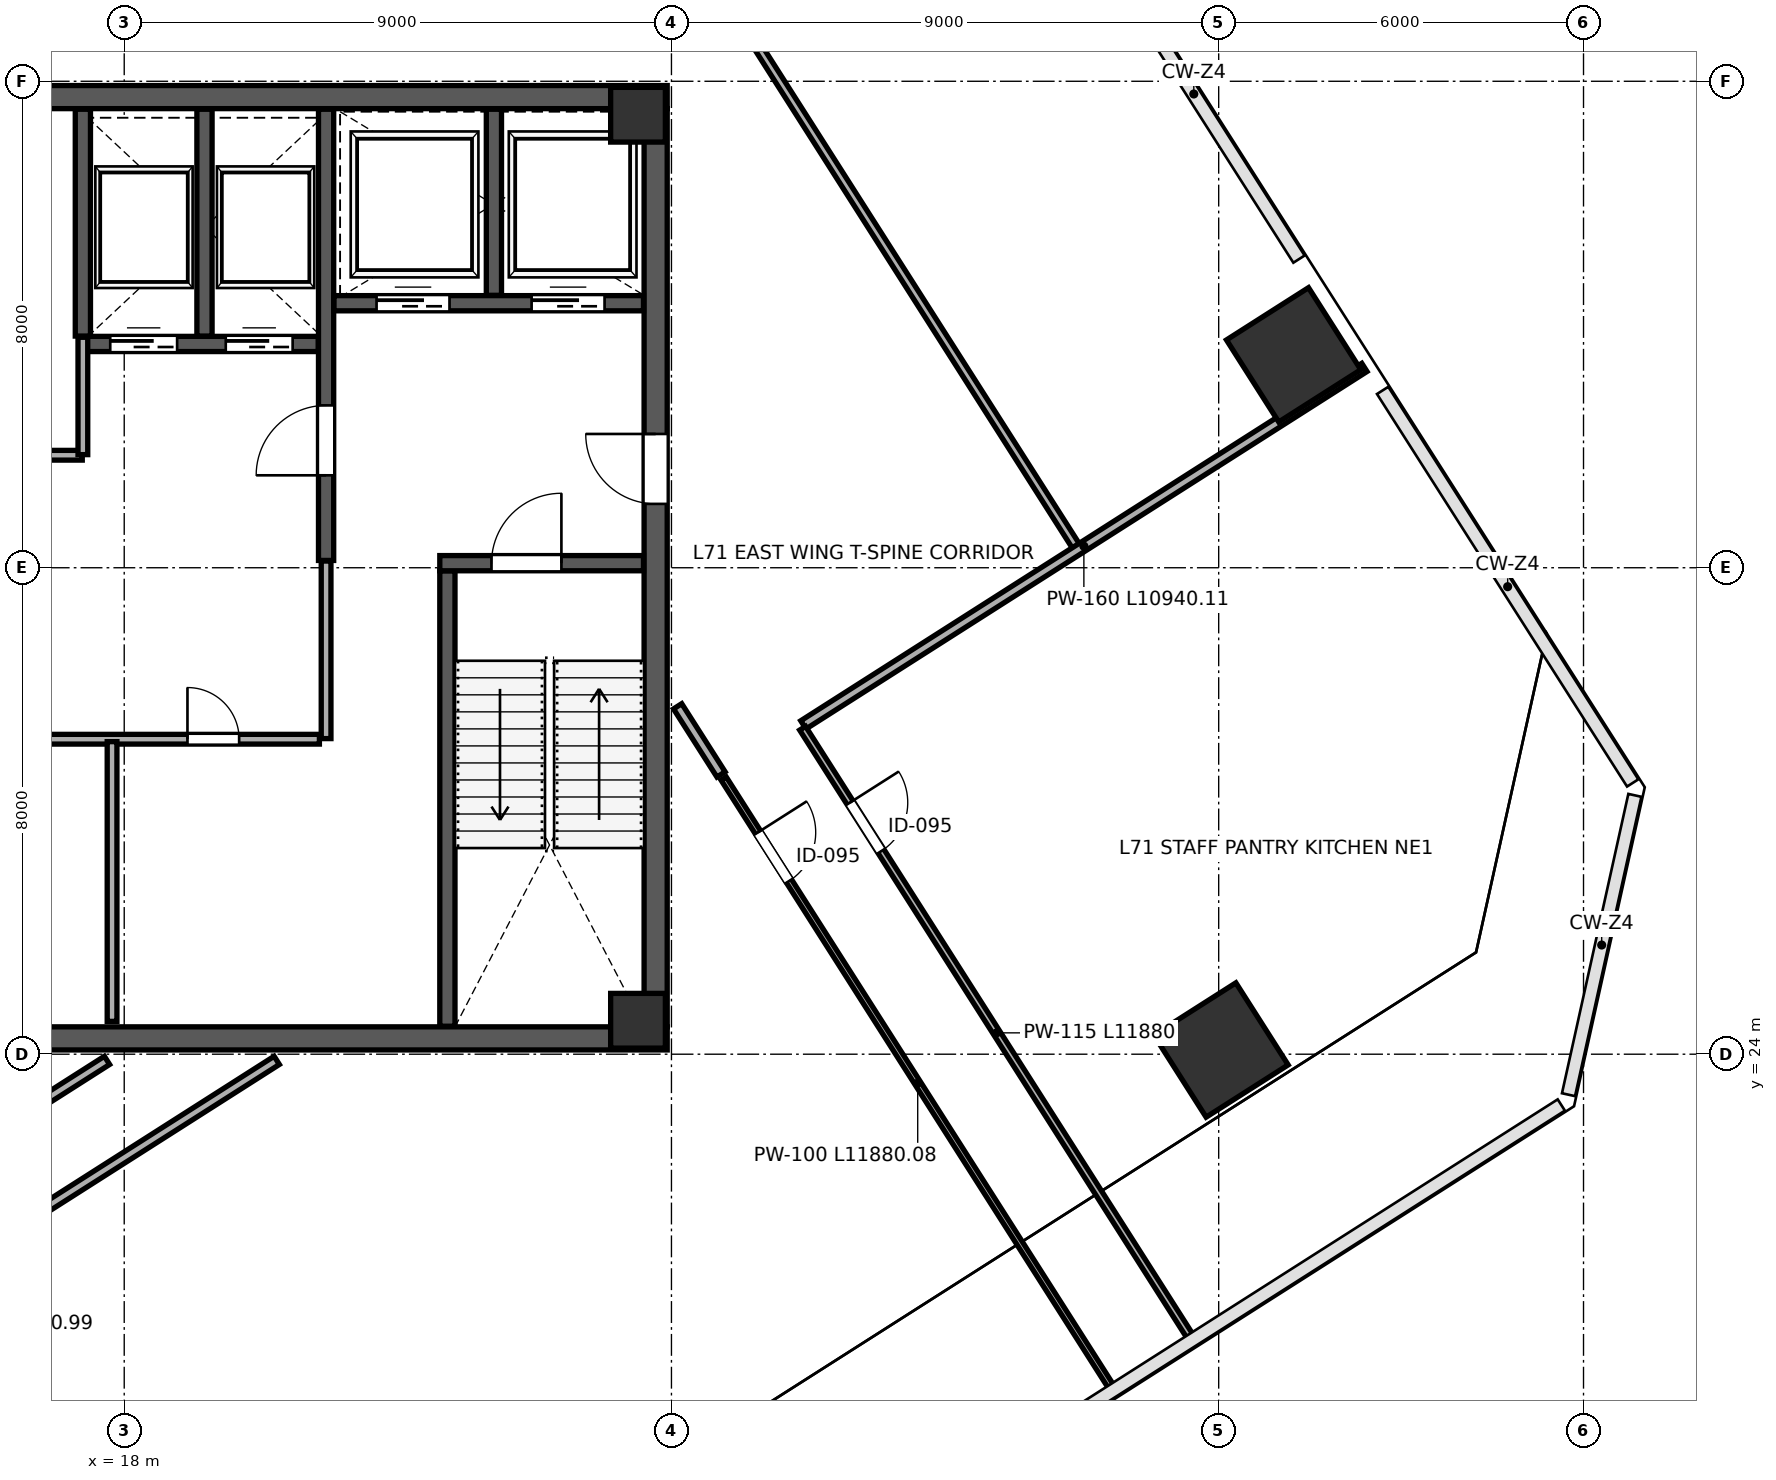
"""IFC4 building model, lengths in metres.
Left out: names, types, materials, properties, quantities, classifications, styles, units other than length and angle.
Written with IfcOpenShell. Run it as: python <this file> out.ifc"""

import sys

from ifc_helpers import new_model, si_unit, direction, frame, frame_2d, origin, origin_2d, place, context, subcontext, project, spatial, rectangle, extrude, source, transform, mapped, element, fill, save


model = new_model("IFC4")
c1 = context("Model", 3, precision=1e-05, world=origin(), true_north=direction((0.0, 1.0)))
c2 = subcontext(c1, "Body", "Model", "MODEL_VIEW")
j1 = project(units=[si_unit("LENGTHUNIT", "METRE"), si_unit("PLANEANGLEUNIT", "RADIAN")], contexts=[c1])
p1 = place(None, origin())
s1 = spatial("IfcSite", under=j1, at=p1, CompositionType="ELEMENT")
p2 = place(p1, origin())
s2 = spatial("IfcBuilding", under=s1, at=p2, CompositionType="ELEMENT")
p3 = place(p2, frame((0.0, 0.0, 315.6)))
s3 = spatial("IfcBuildingStorey", under=s2, at=p3, CompositionType="ELEMENT", Elevation=315.6)
m1 = source(origin(), c2, "Body", "SweptSolid", [
    extrude(rectangle(XDim=0.9, YDim=0.9, at=origin_2d()), origin(), (0.0, 0.0, 1.0), 4.198),
])
for number, where, z_axis, x_axis in (
    (1, (26.45, 24.55, 0.001), (0.0, 0.0, 1.0), (1.0, 0.0, 0.0)),
    (2, (26.45, 39.45, 0.001), (0.0, 0.0, 1.0), (1.0, 0.0, 0.0)),
):
    element("IfcColumn", number, at=place(p3, frame(where, z_axis=z_axis, x_axis=x_axis)), inside=s3, PredefinedType="COLUMN", context=c2, shape_type="MappedRepresentation", body=[
        mapped(m1, transform((0.0, 0.0, 0.0), scale=1.0)),
    ])
m2 = source(origin(), c2, "Body", "SweptSolid", [
    extrude(rectangle(XDim=1.6, YDim=1.6, at=origin_2d()), origin(), (0.0, 0.0, 1.0), 4.198),
])
for number, where, z_axis, x_axis in (
    (3, (37.232, 35.501, 0.001), (0.0, 0.0, 1.0), (-0.537, 0.843, 0.0)),
    (4, (36.038, 24.069, 0.001), (0.0, 0.0, 1.0), (-0.537, 0.843, 0.0)),
):
    element("IfcColumn", number, at=place(p3, frame(where, z_axis=z_axis, x_axis=x_axis)), inside=s3, PredefinedType="COLUMN", context=c2, shape_type="MappedRepresentation", body=[
        mapped(m2, transform((0.0, 0.0, 0.0), scale=1.0)),
    ])
p4 = place(p3, frame((26.74, 24.45, 0.0), z_axis=(0.0, 0.0, 1.0), x_axis=(0.0, 1.0, 0.0)))
e5 = element("IfcWall", 5, at=p4, inside=s3, PredefinedType="SHEAR", context=c2, shape_type="SweptSolid", body=[
    extrude(rectangle(XDim=15.1, YDim=0.38, at=frame_2d((7.55, 0.0))), origin(), (0.0, 0.0, 1.0), 3.96),
])
p5 = place(p4, frame((8.6, 0.0, 0.0)))
e6 = element("IfcOpeningElement", 6, at=p5, cuts=e5, PredefinedType="OPENING", context=c2, shape_type="SweptSolid", body=[
    extrude(rectangle(XDim=1.15, YDim=2.2, at=frame_2d((0.575, 1.1))), frame((0.0, 0.2, 0.0), z_axis=(0.0, -1.0, 0.0), x_axis=(1.0, 0.0, 0.0)), (0.0, 0.0, 1.0), 0.4),
])
for number, where, z_axis, x_axis in (
    (7, (9.07, 24.26, 0.0), (0.0, 0.0, 1.0), (1.0, 0.0, 0.0)),
    (8, (9.07, 39.74, 0.0), (0.0, 0.0, 1.0), (1.0, 0.0, 0.0)),
):
    element("IfcWall", number, at=place(p3, frame(where, z_axis=z_axis, x_axis=x_axis)), inside=s3, PredefinedType="SHEAR", context=c2, shape_type="SweptSolid", body=[
        extrude(rectangle(XDim=17.86, YDim=0.38, at=frame_2d((8.93, 0.0))), origin(), (0.0, 0.0, 1.0), 3.96),
    ])
p6 = place(p3, frame((23.315, 24.46, 0.0), z_axis=(0.0, 0.0, 1.0), x_axis=(0.0, 1.0, 0.0)))
e9 = element("IfcWall", 9, at=p6, inside=s3, PredefinedType="SHEAR", context=c2, shape_type="SweptSolid", body=[
    extrude(rectangle(XDim=7.49, YDim=0.25, at=frame_2d((3.745, 0.0))), origin(), (0.0, 0.0, 1.0), 3.96),
])
p7 = place(p3, frame((23.19, 32.075, 0.0), z_axis=(0.0, 0.0, 1.0), x_axis=(1.0, 0.0, 0.0)))
e10 = element("IfcWall", 10, at=p7, inside=s3, PredefinedType="SHEAR", context=c2, shape_type="SweptSolid", body=[
    extrude(rectangle(XDim=3.35, YDim=0.25, at=frame_2d((1.675, 0.0))), origin(), (0.0, 0.0, 1.0), 3.96),
])
p8 = place(p7, frame((0.85, 0.0, 0.0)))
e11 = element("IfcOpeningElement", 11, at=p8, cuts=e10, PredefinedType="OPENING", context=c2, shape_type="SweptSolid", body=[
    extrude(rectangle(XDim=1.15, YDim=2.2, at=frame_2d((0.575, 1.1))), frame((0.0, 0.135, 0.0), z_axis=(0.0, -1.0, 0.0), x_axis=(1.0, 0.0, 0.0)), (0.0, 0.0, 1.0), 0.27),
])
p9 = place(p3, frame((21.32, 32.12, 0.0), z_axis=(0.0, 0.0, 1.0), x_axis=(0.0, 1.0, 0.0)))
e12 = element("IfcWall", 12, at=p9, inside=s3, PredefinedType="SHEAR", context=c2, shape_type="SweptSolid", body=[
    extrude(rectangle(XDim=7.42, YDim=0.25, at=frame_2d((3.71, 0.0))), origin(), (0.0, 0.0, 1.0), 3.96),
])
p10 = place(p9, frame((1.4, 0.0, 0.0)))
e13 = element("IfcOpeningElement", 13, at=p10, cuts=e12, PredefinedType="OPENING", context=c2, shape_type="SweptSolid", body=[
    extrude(rectangle(XDim=1.15, YDim=2.2, at=frame_2d((0.575, 1.1))), frame((0.0, 0.135, 0.0), z_axis=(0.0, -1.0, 0.0), x_axis=(1.0, 0.0, 0.0)), (0.0, 0.0, 1.0), 0.27),
])
p11 = place(p3, frame((21.45, 36.35, 0.0), z_axis=(0.0, 0.0, 1.0), x_axis=(1.0, 0.0, 0.0)))
e14 = element("IfcWall", 14, at=p11, inside=s3, PredefinedType="SHEAR", context=c2, shape_type="SweptSolid", body=[
    extrude(rectangle(XDim=5.09, YDim=0.25, at=frame_2d((2.545, 0.0))), origin(), (0.0, 0.0, 1.0), 3.96),
])
p12 = place(p11, frame((0.7, 0.0, 0.0)))
e15 = element("IfcOpeningElement", 15, at=p12, cuts=e14, PredefinedType="OPENING", context=c2, shape_type="SweptSolid", body=[
    extrude(rectangle(XDim=1.2, YDim=2.2, at=frame_2d((0.6, 1.1))), frame((0.0, 0.135, 0.0), z_axis=(0.0, -1.0, 0.0), x_axis=(1.0, 0.0, 0.0)), (0.0, 0.0, 1.0), 0.27),
])
p13 = place(p11, frame((3.25, 0.0, 0.0)))
e16 = element("IfcOpeningElement", 16, at=p13, cuts=e14, PredefinedType="OPENING", context=c2, shape_type="SweptSolid", body=[
    extrude(rectangle(XDim=1.2, YDim=2.2, at=frame_2d((0.6, 1.1))), frame((0.0, 0.135, 0.0), z_axis=(0.0, -1.0, 0.0), x_axis=(1.0, 0.0, 0.0)), (0.0, 0.0, 1.0), 0.27),
])
p14 = place(p3, frame((24.08, 36.48, 0.0), z_axis=(0.0, 0.0, 1.0), x_axis=(0.0, 1.0, 0.0)))
e17 = element("IfcWall", 17, at=p14, inside=s3, PredefinedType="SHEAR", context=c2, shape_type="SweptSolid", body=[
    extrude(rectangle(XDim=3.06, YDim=0.25, at=frame_2d((1.53, 0.0))), origin(), (0.0, 0.0, 1.0), 3.96),
])
p15 = place(p3, frame((17.32, 35.68, 0.0), z_axis=(0.0, 0.0, 1.0), x_axis=(1.0, 0.0, 0.0)))
e18 = element("IfcWall", 18, at=p15, inside=s3, PredefinedType="SHEAR", context=c2, shape_type="SweptSolid", body=[
    extrude(rectangle(XDim=3.87, YDim=0.25, at=frame_2d((1.935, 0.0))), origin(), (0.0, 0.0, 1.0), 3.96),
])
p16 = place(p15, frame((0.45, 0.0, 0.0)))
e19 = element("IfcOpeningElement", 19, at=p16, cuts=e18, PredefinedType="OPENING", context=c2, shape_type="SweptSolid", body=[
    extrude(rectangle(XDim=1.1, YDim=2.2, at=frame_2d((0.55, 1.1))), frame((0.0, 0.135, 0.0), z_axis=(0.0, -1.0, 0.0), x_axis=(1.0, 0.0, 0.0)), (0.0, 0.0, 1.0), 0.27),
])
p17 = place(p15, frame((2.35, 0.0, 0.0)))
e20 = element("IfcOpeningElement", 20, at=p17, cuts=e18, PredefinedType="OPENING", context=c2, shape_type="SweptSolid", body=[
    extrude(rectangle(XDim=1.1, YDim=2.2, at=frame_2d((0.55, 1.1))), frame((0.0, 0.135, 0.0), z_axis=(0.0, -1.0, 0.0), x_axis=(1.0, 0.0, 0.0)), (0.0, 0.0, 1.0), 0.27),
])
for number, where, z_axis, x_axis in (
    (21, (17.32, 35.81, 0.0), (0.0, 0.0, 1.0), (0.0, 1.0, 0.0)),
    (22, (19.32, 35.81, 0.0), (0.0, 0.0, 1.0), (0.0, 1.0, 0.0)),
):
    element("IfcWall", number, at=place(p3, frame(where, z_axis=z_axis, x_axis=x_axis)), inside=s3, PredefinedType="SHEAR", context=c2, shape_type="SweptSolid", body=[
        extrude(rectangle(XDim=3.73, YDim=0.25, at=frame_2d((1.865, 0.0))), origin(), (0.0, 0.0, 1.0), 3.96),
    ])
p18 = place(p3, frame((13.21, 33.85, 0.0), z_axis=(0.0, 0.0, 1.0), x_axis=(1.0, 0.0, 0.0)))
e23 = element("IfcWall", 23, at=p18, inside=s3, PredefinedType="PARTITIONING", context=c2, shape_type="SweptSolid", body=[
    extrude(rectangle(XDim=4.1, YDim=0.16, at=frame_2d((2.05, 0.0))), origin(), (0.0, 0.0, 1.0), 3.96),
])
p19 = place(p18, frame((1.35, 0.0, 0.0)))
e24 = element("IfcOpeningElement", 24, at=p19, cuts=e23, PredefinedType="OPENING", context=c2, shape_type="SweptSolid", body=[
    extrude(rectangle(XDim=0.9, YDim=2.15, at=frame_2d((0.45, 1.075))), frame((0.0, 0.09, 0.0), z_axis=(0.0, -1.0, 0.0), x_axis=(1.0, 0.0, 0.0)), (0.0, 0.0, 1.0), 0.18),
])
p20 = place(p3, frame((17.32, 33.86, 0.0), z_axis=(0.0, 0.0, 1.0), x_axis=(0.0, 1.0, 0.0)))
e25 = element("IfcWall", 25, at=p20, inside=s3, PredefinedType="PARTITIONING", context=c2, shape_type="SweptSolid", body=[
    extrude(rectangle(XDim=1.93, YDim=0.16, at=frame_2d((0.965, 0.0))), origin(), (0.0, 0.0, 1.0), 3.96),
])
p21 = place(p3, frame((12.84, 29.18, 0.0), z_axis=(0.0, 0.0, 1.0), x_axis=(1.0, 0.0, 0.0)))
e26 = element("IfcWall", 26, at=p21, inside=s3, PredefinedType="PARTITIONING", context=c2, shape_type="SweptSolid", body=[
    extrude(rectangle(XDim=8.37, YDim=0.16, at=frame_2d((4.185, 0.0))), origin(), (0.0, 0.0, 1.0), 3.96),
])
p22 = place(p21, frame((2.1, 0.0, 0.0)))
e27 = element("IfcOpeningElement", 27, at=p22, cuts=e26, PredefinedType="OPENING", context=c2, shape_type="SweptSolid", body=[
    extrude(rectangle(XDim=0.9, YDim=2.15, at=frame_2d((0.45, 1.075))), frame((0.0, 0.09, 0.0), z_axis=(0.0, -1.0, 0.0), x_axis=(1.0, 0.0, 0.0)), (0.0, 0.0, 1.0), 0.18),
])
p23 = place(p21, frame((6.2, 0.0, 0.0)))
e28 = element("IfcOpeningElement", 28, at=p23, cuts=e26, PredefinedType="OPENING", context=c2, shape_type="SweptSolid", body=[
    extrude(rectangle(XDim=0.85, YDim=2.1, at=frame_2d((0.425, 1.05))), frame((0.0, 0.09, 0.0), z_axis=(0.0, -1.0, 0.0), x_axis=(1.0, 0.0, 0.0)), (0.0, 0.0, 1.0), 0.18),
])
p24 = place(p3, frame((17.8, 24.54, 0.0), z_axis=(0.0, 0.0, 1.0), x_axis=(0.0, 1.0, 0.0)))
e29 = element("IfcWall", 29, at=p24, inside=s3, PredefinedType="PARTITIONING", context=c2, shape_type="SweptSolid", body=[
    extrude(rectangle(XDim=4.6, YDim=0.16, at=frame_2d((2.3, 0.0))), origin(), (0.0, 0.0, 1.0), 3.96),
])
p25 = place(p3, frame((21.32, 29.19, 0.0), z_axis=(0.0, 0.0, 1.0), x_axis=(0.0, 1.0, 0.0)))
e30 = element("IfcWall", 30, at=p25, inside=s3, PredefinedType="PARTITIONING", context=c2, shape_type="SweptSolid", body=[
    extrude(rectangle(XDim=2.92, YDim=0.16, at=frame_2d((1.46, 0.0))), origin(), (0.0, 0.0, 1.0), 3.96),
])
p26 = place(p3, frame((10.661, 19.403, 0.0), z_axis=(0.0, 0.0, 1.0), x_axis=(0.843399441764, 0.537287057012, 0.0)))
e31 = element("IfcWall", 31, at=p26, inside=s3, PredefinedType="PARTITIONING", context=c2, shape_type="SweptSolid", body=[
    extrude(rectangle(XDim=8.366, YDim=0.16, at=frame_2d((4.183, 0.0))), origin(), (0.0, 0.0, 1.0), 3.96),
])
p27 = place(p3, frame((27.102, 29.721, 0.0), z_axis=(0.0, 0.0, 1.0), x_axis=(0.537279676557, -0.843404143432, 0.0)))
e32 = element("IfcWall", 32, at=p27, inside=s3, PredefinedType="PARTITIONING", context=c2, shape_type="SweptSolid", body=[
    extrude(rectangle(XDim=1.329, YDim=0.16, at=frame_2d((0.664, 0.0))), origin(), (0.0, 0.0, 1.0), 3.96),
])
p28 = place(p3, frame((22.509, 49.847, 0.0), z_axis=(0.0, 0.0, 1.0), x_axis=(0.537290700932, -0.843397120396, 0.0)))
e33 = element("IfcWall", 33, at=p28, inside=s3, PredefinedType="PARTITIONING", context=c2, shape_type="SweptSolid", body=[
    extrude(rectangle(XDim=20.77, YDim=0.135, at=frame_2d((10.385, 0.0))), origin(), (0.0, 0.0, 1.0), 3.96),
])
p29 = place(p28, frame((4.3, 0.0, 0.0)))
e34 = element("IfcOpeningElement", 34, at=p29, cuts=e33, PredefinedType="OPENING", context=c2, shape_type="SweptSolid", body=[
    extrude(rectangle(XDim=0.95, YDim=2.15, at=frame_2d((0.475, 1.075))), frame((0.0, 0.078, 0.0), z_axis=(0.0, -1.0, 0.0), x_axis=(1.0, 0.0, 0.0)), (0.0, 0.0, 1.0), 0.155),
])
p30 = place(p3, frame((29.169, 29.416, 0.0), z_axis=(0.0, 0.0, 1.0), x_axis=(0.843389386546, 0.537302840734, 0.0)))
e35 = element("IfcWall", 35, at=p30, inside=s3, PredefinedType="PARTITIONING", context=c2, shape_type="SweptSolid", body=[
    extrude(rectangle(XDim=10.94, YDim=0.16, at=frame_2d((5.47, 0.0))), origin(), (0.0, 0.0, 1.0), 3.96),
])
p31 = place(p3, frame((9.687, 17.004, 0.0), z_axis=(0.0, 0.0, 1.0), x_axis=(0.843392646996, 0.537297722862, 0.0)))
e36 = element("IfcWall", 36, at=p31, inside=s3, PredefinedType="PARTITIONING", context=c2, shape_type="SweptSolid", body=[
    extrude(rectangle(XDim=12.831, YDim=0.16, at=frame_2d((6.416, 0.0))), origin(), (0.0, 0.0, 1.0), 3.96),
])
p32 = place(p3, frame((29.157, 29.361, 0.0), z_axis=(0.0, 0.0, 1.0), x_axis=(0.537294294715, -0.843394830946, 0.0)))
e37 = element("IfcWall", 37, at=p32, inside=s3, PredefinedType="PARTITIONING", context=c2, shape_type="SweptSolid", body=[
    extrude(rectangle(XDim=11.88, YDim=0.115, at=frame_2d((5.94, 0.0))), origin(), (0.0, 0.0, 1.0), 3.96),
])
p33 = place(p32, frame((1.45, 0.0, 0.0)))
e38 = element("IfcOpeningElement", 38, at=p33, cuts=e37, PredefinedType="OPENING", context=c2, shape_type="SweptSolid", body=[
    extrude(rectangle(XDim=0.95, YDim=2.15, at=frame_2d((0.475, 1.075))), frame((0.0, 0.067, 0.0), z_axis=(0.0, -1.0, 0.0), x_axis=(1.0, 0.0, 0.0)), (0.0, 0.0, 1.0), 0.135),
])
p34 = place(p3, frame((27.858, 28.533, 0.0), z_axis=(0.0, 0.0, 1.0), x_axis=(0.537294294715, -0.843394830946, 0.0)))
e39 = element("IfcWall", 39, at=p34, inside=s3, PredefinedType="PARTITIONING", context=c2, shape_type="SweptSolid", body=[
    extrude(rectangle(XDim=11.88, YDim=0.1, at=frame_2d((5.94, 0.0))), origin(), (0.0, 0.0, 1.0), 3.96),
])
p35 = place(p34, frame((1.05, 0.0, 0.0)))
e40 = element("IfcOpeningElement", 40, at=p35, cuts=e39, PredefinedType="OPENING", context=c2, shape_type="SweptSolid", body=[
    extrude(rectangle(XDim=0.95, YDim=2.15, at=frame_2d((0.475, 1.075))), frame((0.0, 0.06, 0.0), z_axis=(0.0, -1.0, 0.0), x_axis=(1.0, 0.0, 0.0)), (0.0, 0.0, 1.0), 0.12),
])
m3 = source(origin(), c2, "Body", "SweptSolid", [
    extrude(rectangle(XDim=1.15, YDim=2.2, at=frame_2d((0.575, 1.1))), frame((0.0, 0.025, 0.0), z_axis=(0.0, -1.0, 0.0), x_axis=(1.0, 0.0, 0.0)), (0.0, 0.0, 1.0), 0.05),
])
p36 = place(p10, origin())
e41 = element("IfcDoor", 41, at=p36, inside=s3, OperationType="SINGLE_SWING_LEFT", PredefinedType="DOOR", context=c2, shape_type="MappedRepresentation", body=[
    mapped(m3, transform((0.0, 0.0, 0.0), scale=1.0)),
])
fill(e13, e41)
m4 = source(origin(), c2, "Body", "SweptSolid", [
    extrude(rectangle(XDim=1.15, YDim=2.2, at=frame_2d((0.575, 1.1))), frame((0.0, 0.025, 0.0), z_axis=(0.0, -1.0, 0.0), x_axis=(1.0, 0.0, 0.0)), (0.0, 0.0, 1.0), 0.05),
])
p37 = place(p8, origin())
e42 = element("IfcDoor", 42, at=p37, inside=s3, OperationType="SINGLE_SWING_RIGHT", PredefinedType="DOOR", context=c2, shape_type="MappedRepresentation", body=[
    mapped(m4, transform((0.0, 0.0, 0.0), scale=1.0)),
])
fill(e11, e42)
p38 = place(p5, origin())
e43 = element("IfcDoor", 43, at=p38, inside=s3, OperationType="SINGLE_SWING_RIGHT", PredefinedType="DOOR", context=c2, shape_type="MappedRepresentation", body=[
    mapped(m3, transform((0.0, 0.0, 0.0), scale=1.0)),
])
fill(e6, e43)
m5 = source(origin(), c2, "Body", "SweptSolid", [
    extrude(rectangle(XDim=1.1, YDim=2.2, at=frame_2d((0.55, 1.1))), frame((0.0, 0.025, 0.0), z_axis=(0.0, -1.0, 0.0), x_axis=(1.0, 0.0, 0.0)), (0.0, 0.0, 1.0), 0.05),
])
p39 = place(p16, origin())
e44 = element("IfcDoor", 44, at=p39, inside=s3, OperationType="SLIDING_TO_LEFT", PredefinedType="DOOR", context=c2, shape_type="MappedRepresentation", body=[
    mapped(m5, transform((0.0, 0.0, 0.0), scale=1.0)),
])
fill(e19, e44)
p40 = place(p17, origin())
e45 = element("IfcDoor", 45, at=p40, inside=s3, OperationType="SLIDING_TO_RIGHT", PredefinedType="DOOR", context=c2, shape_type="MappedRepresentation", body=[
    mapped(m5, transform((0.0, 0.0, 0.0), scale=1.0)),
])
fill(e20, e45)
m6 = source(origin(), c2, "Body", "SweptSolid", [
    extrude(rectangle(XDim=1.2, YDim=2.2, at=frame_2d((0.6, 1.1))), frame((0.0, 0.025, 0.0), z_axis=(0.0, -1.0, 0.0), x_axis=(1.0, 0.0, 0.0)), (0.0, 0.0, 1.0), 0.05),
])
p41 = place(p12, origin())
e46 = element("IfcDoor", 46, at=p41, inside=s3, OperationType="SLIDING_TO_LEFT", PredefinedType="DOOR", context=c2, shape_type="MappedRepresentation", body=[
    mapped(m6, transform((0.0, 0.0, 0.0), scale=1.0)),
])
fill(e15, e46)
p42 = place(p13, origin())
e47 = element("IfcDoor", 47, at=p42, inside=s3, OperationType="SLIDING_TO_RIGHT", PredefinedType="DOOR", context=c2, shape_type="MappedRepresentation", body=[
    mapped(m6, transform((0.0, 0.0, 0.0), scale=1.0)),
])
fill(e16, e47)
m7 = source(origin(), c2, "Body", "SweptSolid", [
    extrude(rectangle(XDim=0.85, YDim=2.1, at=frame_2d((0.425, 1.05))), frame((0.0, 0.025, 0.0), z_axis=(0.0, -1.0, 0.0), x_axis=(1.0, 0.0, 0.0)), (0.0, 0.0, 1.0), 0.05),
])
p43 = place(p23, origin())
e48 = element("IfcDoor", 48, at=p43, inside=s3, OperationType="SINGLE_SWING_LEFT", PredefinedType="DOOR", context=c2, shape_type="MappedRepresentation", body=[
    mapped(m7, transform((0.0, 0.0, 0.0), scale=1.0)),
])
fill(e28, e48)
m8 = source(origin(), c2, "Body", "SweptSolid", [
    extrude(rectangle(XDim=0.95, YDim=2.15, at=frame_2d((0.475, 1.075))), frame((0.0, 0.025, 0.0), z_axis=(0.0, -1.0, 0.0), x_axis=(1.0, 0.0, 0.0)), (0.0, 0.0, 1.0), 0.05),
])
p44 = place(p33, origin())
e49 = element("IfcDoor", 49, at=p44, inside=s3, OperationType="SINGLE_SWING_LEFT", PredefinedType="DOOR", context=c2, shape_type="MappedRepresentation", body=[
    mapped(m8, transform((0.0, 0.0, 0.0), scale=1.0)),
])
fill(e38, e49)
p45 = place(p35, origin())
e50 = element("IfcDoor", 50, at=p45, inside=s3, OperationType="SINGLE_SWING_LEFT", PredefinedType="DOOR", context=c2, shape_type="MappedRepresentation", body=[
    mapped(m8, transform((0.0, 0.0, 0.0), scale=1.0)),
])
fill(e40, e50)
save(model, sys.argv[1])
